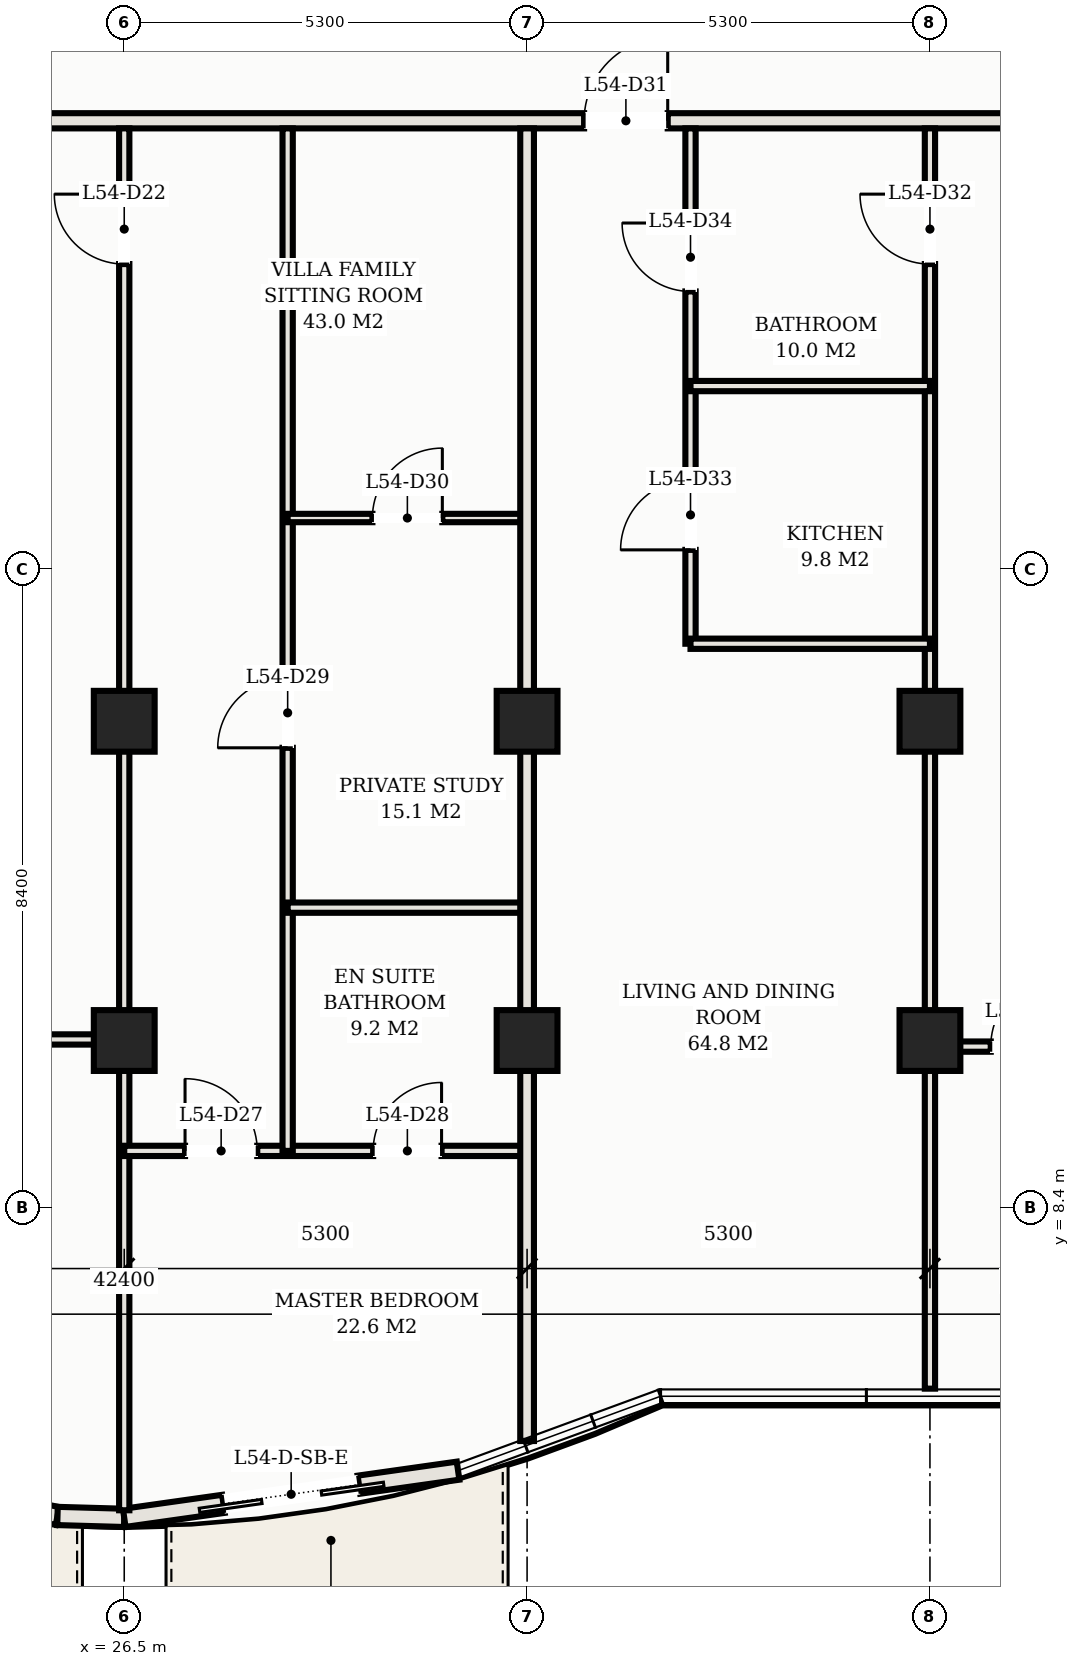
"""IFC4 building model, lengths in metres.
Left out: names, types, materials, properties, quantities, classifications, styles, units other than length and angle.
Written with IfcOpenShell. Run it as: python <this file> out.ifc"""

import sys

from ifc_helpers import new_model, si_unit, direction, frame, frame_2d, origin, origin_2d, place, context, subcontext, project, spatial, rectangle, hollow_rectangle, extrude, element, fill, save


model = new_model("IFC4")
c1 = context("Model", 3, precision=1e-05, world=origin(), true_north=direction((0.0, 1.0)))
c2 = subcontext(c1, "Body", "Model", "MODEL_VIEW")
j1 = project(units=[si_unit("LENGTHUNIT", "METRE"), si_unit("PLANEANGLEUNIT", "RADIAN")], contexts=[c1])
p1 = place(None, origin())
s1 = spatial("IfcSite", under=j1, at=p1, CompositionType="ELEMENT")
p2 = place(p1, origin())
s2 = spatial("IfcBuilding", under=s1, at=p2, CompositionType="ELEMENT")
p3 = place(p2, frame((0.0, 0.0, 200.0)))
s3 = spatial("IfcBuildingStorey", under=s2, at=p3, CompositionType="ELEMENT", Elevation=200.0)
for number, where, z_axis, x_axis in (
    (1, (26.5, 14.8, 0.0), (0.0, 0.0, 1.0), (1.0, 0.0, 0.0)),
    (2, (26.5, 10.6, 0.0), (0.0, 0.0, 1.0), (1.0, 0.0, 0.0)),
    (3, (31.8, 14.8, 0.0), (0.0, 0.0, 1.0), (1.0, 0.0, 0.0)),
    (4, (31.8, 10.6, 0.0), (0.0, 0.0, 1.0), (1.0, 0.0, 0.0)),
    (5, (37.1, 14.8, 0.0), (0.0, 0.0, 1.0), (1.0, 0.0, 0.0)),
    (6, (37.1, 10.6, 0.0), (0.0, 0.0, 1.0), (1.0, 0.0, 0.0)),
):
    element("IfcColumn", number, at=place(p3, frame(where, z_axis=z_axis, x_axis=x_axis)), inside=s3, PredefinedType="COLUMN", context=c2, shape_type="SweptSolid", body=[
        extrude(hollow_rectangle(XDim=0.8, YDim=0.8, WallThickness=0.028, at=origin_2d()), origin(), (0.0, 0.0, 1.0), 3.3),
    ])
p4 = place(p3, frame((21.229, 5.214, 0.0), z_axis=(0.0, 0.0, 1.0), x_axis=(0.980985349685, -0.194081796425, 0.0)))
e7 = element("IfcWall", 7, at=p4, inside=s3, PredefinedType="SOLIDWALL", context=c2, shape_type="SweptSolid", body=[
    extrude(rectangle(XDim=4.478, YDim=0.24, at=frame_2d((2.239, 0.0))), origin(), (0.0, 0.0, 1.0), 3.11),
])
p5 = place(p4, frame((1.381, 0.0, 0.0)))
e8 = element("IfcOpeningElement", 8, at=p5, cuts=e7, PredefinedType="OPENING", context=c2, shape_type="SweptSolid", body=[
    extrude(rectangle(XDim=1.8, YDim=2.2, at=frame_2d((0.9, 1.1))), frame((0.0, 0.13, 0.0), z_axis=(0.0, -1.0, 0.0), x_axis=(1.0, 0.0, 0.0)), (0.0, 0.0, 1.0), 0.26),
])
p6 = place(p3, frame((25.622, 4.345, 0.0), z_axis=(0.0, 0.0, 1.0), x_axis=(0.999597960231, -0.028353446035, 0.0)))
e9 = element("IfcWall", 9, at=p6, inside=s3, PredefinedType="SOLIDWALL", context=c2, shape_type="SweptSolid", body=[
    extrude(rectangle(XDim=0.878, YDim=0.24, at=frame_2d((0.439, 0.0))), origin(), (0.0, 0.0, 1.0), 3.11),
])
p7 = place(p3, frame((26.5, 4.32, 0.0), z_axis=(0.0, 0.0, 1.0), x_axis=(0.990156470874, 0.139964864115, 0.0)))
e10 = element("IfcWall", 10, at=p7, inside=s3, PredefinedType="SOLIDWALL", context=c2, shape_type="SweptSolid", body=[
    extrude(rectangle(XDim=4.436, YDim=0.24, at=frame_2d((2.218, 0.0))), origin(), (0.0, 0.0, 1.0), 3.11),
])
p8 = place(p7, frame((1.318, 0.0, 0.0)))
e11 = element("IfcOpeningElement", 11, at=p8, cuts=e10, PredefinedType="OPENING", context=c2, shape_type="SweptSolid", body=[
    extrude(rectangle(XDim=1.8, YDim=2.2, at=frame_2d((0.9, 1.1))), frame((0.0, 0.13, 0.0), z_axis=(0.0, -1.0, 0.0), x_axis=(1.0, 0.0, 0.0)), (0.0, 0.0, 1.0), 0.26),
])
p9 = place(p3, frame((6.72, 22.7, 0.0), z_axis=(0.0, 0.0, 1.0), x_axis=(1.0, 0.0, 0.0)))
e12 = element("IfcWall", 12, at=p9, inside=s3, PredefinedType="PARTITIONING", context=c2, shape_type="SweptSolid", body=[
    extrude(rectangle(XDim=39.56, YDim=0.2, at=frame_2d((19.78, 0.0))), origin(), (0.0, 0.0, 1.0), 2.43),
])
p10 = place(p9, frame((4.63, 0.0, 0.0)))
e13 = element("IfcOpeningElement", 13, at=p10, cuts=e12, PredefinedType="OPENING", context=c2, shape_type="SweptSolid", body=[
    extrude(rectangle(XDim=1.1, YDim=2.25, at=frame_2d((0.55, 1.125))), frame((0.0, 0.11, 0.0), z_axis=(0.0, -1.0, 0.0), x_axis=(1.0, 0.0, 0.0)), (0.0, 0.0, 1.0), 0.22),
])
p11 = place(p9, frame((9.93, 0.0, 0.0)))
e14 = element("IfcOpeningElement", 14, at=p11, cuts=e12, PredefinedType="OPENING", context=c2, shape_type="SweptSolid", body=[
    extrude(rectangle(XDim=1.1, YDim=2.25, at=frame_2d((0.55, 1.125))), frame((0.0, 0.11, 0.0), z_axis=(0.0, -1.0, 0.0), x_axis=(1.0, 0.0, 0.0)), (0.0, 0.0, 1.0), 0.22),
])
p12 = place(p9, frame((25.83, 0.0, 0.0)))
e15 = element("IfcOpeningElement", 15, at=p12, cuts=e12, PredefinedType="OPENING", context=c2, shape_type="SweptSolid", body=[
    extrude(rectangle(XDim=1.1, YDim=2.25, at=frame_2d((0.55, 1.125))), frame((0.0, 0.11, 0.0), z_axis=(0.0, -1.0, 0.0), x_axis=(1.0, 0.0, 0.0)), (0.0, 0.0, 1.0), 0.22),
])
p13 = place(p9, frame((1.435, 0.0, 0.0)))
e16 = element("IfcOpeningElement", 16, at=p13, cuts=e12, PredefinedType="OPENING", context=c2, shape_type="SweptSolid", body=[
    extrude(rectangle(XDim=0.92, YDim=2.15, at=frame_2d((0.46, 1.075))), frame((0.0, 0.11, 0.0), z_axis=(0.0, -1.0, 0.0), x_axis=(1.0, 0.0, 0.0)), (0.0, 0.0, 1.0), 0.22),
])
p14 = place(p9, frame((37.205, 0.0, 0.0)))
e17 = element("IfcOpeningElement", 17, at=p14, cuts=e12, PredefinedType="OPENING", context=c2, shape_type="SweptSolid", body=[
    extrude(rectangle(XDim=0.92, YDim=2.15, at=frame_2d((0.46, 1.075))), frame((0.0, 0.11, 0.0), z_axis=(0.0, -1.0, 0.0), x_axis=(1.0, 0.0, 0.0)), (0.0, 0.0, 1.0), 0.22),
])
p15 = place(p3, frame((26.5, 4.42, 0.0), z_axis=(0.0, 0.0, 1.0), x_axis=(0.0, 1.0, 0.0)))
e18 = element("IfcWall", 18, at=p15, inside=s3, PredefinedType="PARTITIONING", context=c2, shape_type="SweptSolid", body=[
    extrude(rectangle(XDim=18.18, YDim=0.135, at=frame_2d((9.09, 0.0))), origin(), (0.0, 0.0, 1.0), 2.43),
])
p16 = place(p15, frame((16.395, 0.0, 0.0)))
e19 = element("IfcOpeningElement", 19, at=p16, cuts=e18, PredefinedType="OPENING", context=c2, shape_type="SweptSolid", body=[
    extrude(rectangle(XDim=0.92, YDim=2.15, at=frame_2d((0.46, 1.075))), frame((0.0, 0.078, 0.0), z_axis=(0.0, -1.0, 0.0), x_axis=(1.0, 0.0, 0.0)), (0.0, 0.0, 1.0), 0.155),
])
p17 = place(p3, frame((15.9, 10.614, 0.0), z_axis=(0.0, 0.0, 1.0), x_axis=(1.0, 0.0, 0.0)))
e20 = element("IfcWall", 20, at=p17, inside=s3, PredefinedType="PARTITIONING", context=c2, shape_type="SweptSolid", body=[
    extrude(rectangle(XDim=10.6, YDim=0.135, at=frame_2d((5.3, 0.0))), origin(), (0.0, 0.0, 1.0), 2.43),
])
p18 = place(p17, frame((0.815, 0.0, 0.0)))
e21 = element("IfcOpeningElement", 21, at=p18, cuts=e20, PredefinedType="OPENING", context=c2, shape_type="SweptSolid", body=[
    extrude(rectangle(XDim=0.92, YDim=2.15, at=frame_2d((0.46, 1.075))), frame((0.0, 0.078, 0.0), z_axis=(0.0, -1.0, 0.0), x_axis=(1.0, 0.0, 0.0)), (0.0, 0.0, 1.0), 0.155),
])
p19 = place(p3, frame((26.5, 9.148, 0.0), z_axis=(0.0, 0.0, 1.0), x_axis=(1.0, 0.0, 0.0)))
e22 = element("IfcWall", 22, at=p19, inside=s3, PredefinedType="PARTITIONING", context=c2, shape_type="SweptSolid", body=[
    extrude(rectangle(XDim=5.3, YDim=0.135, at=frame_2d((2.65, 0.0))), origin(), (0.0, 0.0, 1.0), 2.43),
])
p20 = place(p19, frame((0.8, 0.0, 0.0)))
e23 = element("IfcOpeningElement", 23, at=p20, cuts=e22, PredefinedType="OPENING", context=c2, shape_type="SweptSolid", body=[
    extrude(rectangle(XDim=0.95, YDim=2.15, at=frame_2d((0.475, 1.075))), frame((0.0, 0.078, 0.0), z_axis=(0.0, -1.0, 0.0), x_axis=(1.0, 0.0, 0.0)), (0.0, 0.0, 1.0), 0.155),
])
p21 = place(p19, frame((3.275, 0.0, 0.0)))
e24 = element("IfcOpeningElement", 24, at=p21, cuts=e22, PredefinedType="OPENING", context=c2, shape_type="SweptSolid", body=[
    extrude(rectangle(XDim=0.9, YDim=2.15, at=frame_2d((0.45, 1.075))), frame((0.0, 0.078, 0.0), z_axis=(0.0, -1.0, 0.0), x_axis=(1.0, 0.0, 0.0)), (0.0, 0.0, 1.0), 0.155),
])
p22 = place(p3, frame((28.65, 9.148, 0.0), z_axis=(0.0, 0.0, 1.0), x_axis=(0.0, 1.0, 0.0)))
e25 = element("IfcWall", 25, at=p22, inside=s3, PredefinedType="PARTITIONING", context=c2, shape_type="SweptSolid", body=[
    extrude(rectangle(XDim=13.452, YDim=0.135, at=frame_2d((6.726, 0.0))), origin(), (0.0, 0.0, 1.0), 2.43),
])
p23 = place(p22, frame((5.303, 0.0, 0.0)))
e26 = element("IfcOpeningElement", 26, at=p23, cuts=e25, PredefinedType="OPENING", context=c2, shape_type="SweptSolid", body=[
    extrude(rectangle(XDim=0.92, YDim=2.15, at=frame_2d((0.46, 1.075))), frame((0.0, 0.078, 0.0), z_axis=(0.0, -1.0, 0.0), x_axis=(1.0, 0.0, 0.0)), (0.0, 0.0, 1.0), 0.155),
])
p24 = place(p3, frame((28.65, 12.348, 0.0), z_axis=(0.0, 0.0, 1.0), x_axis=(1.0, 0.0, 0.0)))
e27 = element("IfcWall", 27, at=p24, inside=s3, PredefinedType="PARTITIONING", context=c2, shape_type="SweptSolid", body=[
    extrude(rectangle(XDim=3.15, YDim=0.135, at=frame_2d((1.575, 0.0))), origin(), (0.0, 0.0, 1.0), 2.43),
])
p25 = place(p3, frame((28.65, 17.474, 0.0), z_axis=(0.0, 0.0, 1.0), x_axis=(1.0, 0.0, 0.0)))
e28 = element("IfcWall", 28, at=p25, inside=s3, PredefinedType="MOVABLE", context=c2, shape_type="SweptSolid", body=[
    extrude(rectangle(XDim=3.15, YDim=0.11, at=frame_2d((1.575, 0.0))), origin(), (0.0, 0.0, 1.0), 2.43),
])
p26 = place(p25, frame((1.115, 0.0, 0.0)))
e29 = element("IfcOpeningElement", 29, at=p26, cuts=e28, PredefinedType="OPENING", context=c2, shape_type="SweptSolid", body=[
    extrude(rectangle(XDim=0.92, YDim=2.15, at=frame_2d((0.46, 1.075))), frame((0.0, 0.065, 0.0), z_axis=(0.0, -1.0, 0.0), x_axis=(1.0, 0.0, 0.0)), (0.0, 0.0, 1.0), 0.13),
])
p27 = place(p3, frame((31.8, 5.331, 0.0), z_axis=(0.0, 0.0, 1.0), x_axis=(0.0, 1.0, 0.0)))
e30 = element("IfcWall", 30, at=p27, inside=s3, PredefinedType="PARTITIONING", context=c2, shape_type="SweptSolid", body=[
    extrude(rectangle(XDim=17.269, YDim=0.18, at=frame_2d((8.635, 0.0))), origin(), (0.0, 0.0, 1.0), 2.43),
])
p28 = place(p3, frame((37.1, 6.02, 0.0), z_axis=(0.0, 0.0, 1.0), x_axis=(0.0, 1.0, 0.0)))
e31 = element("IfcWall", 31, at=p28, inside=s3, PredefinedType="PARTITIONING", context=c2, shape_type="SweptSolid", body=[
    extrude(rectangle(XDim=16.58, YDim=0.135, at=frame_2d((8.29, 0.0))), origin(), (0.0, 0.0, 1.0), 2.43),
])
p29 = place(p28, frame((14.795, 0.0, 0.0)))
e32 = element("IfcOpeningElement", 32, at=p29, cuts=e31, PredefinedType="OPENING", context=c2, shape_type="SweptSolid", body=[
    extrude(rectangle(XDim=0.92, YDim=2.15, at=frame_2d((0.46, 1.075))), frame((0.0, 0.078, 0.0), z_axis=(0.0, -1.0, 0.0), x_axis=(1.0, 0.0, 0.0)), (0.0, 0.0, 1.0), 0.155),
])
p30 = place(p3, frame((33.95, 15.82, 0.0), z_axis=(0.0, 0.0, 1.0), x_axis=(0.0, 1.0, 0.0)))
e33 = element("IfcWall", 33, at=p30, inside=s3, PredefinedType="PARTITIONING", context=c2, shape_type="SweptSolid", body=[
    extrude(rectangle(XDim=6.78, YDim=0.135, at=frame_2d((3.39, 0.0))), origin(), (0.0, 0.0, 1.0), 2.43),
])
p31 = place(p30, frame((1.235, 0.0, 0.0)))
e34 = element("IfcOpeningElement", 34, at=p31, cuts=e33, PredefinedType="OPENING", context=c2, shape_type="SweptSolid", body=[
    extrude(rectangle(XDim=0.92, YDim=2.15, at=frame_2d((0.46, 1.075))), frame((0.0, 0.078, 0.0), z_axis=(0.0, -1.0, 0.0), x_axis=(1.0, 0.0, 0.0)), (0.0, 0.0, 1.0), 0.155),
])
p32 = place(p30, frame((4.635, 0.0, 0.0)))
e35 = element("IfcOpeningElement", 35, at=p32, cuts=e33, PredefinedType="OPENING", context=c2, shape_type="SweptSolid", body=[
    extrude(rectangle(XDim=0.9, YDim=2.15, at=frame_2d((0.45, 1.075))), frame((0.0, 0.078, 0.0), z_axis=(0.0, -1.0, 0.0), x_axis=(1.0, 0.0, 0.0)), (0.0, 0.0, 1.0), 0.155),
])
for number, where, z_axis, x_axis in (
    (36, (33.95, 15.82, 0.0), (0.0, 0.0, 1.0), (1.0, 0.0, 0.0)),
    (37, (33.95, 19.21, 0.0), (0.0, 0.0, 1.0), (1.0, 0.0, 0.0)),
):
    element("IfcWall", number, at=place(p3, frame(where, z_axis=z_axis, x_axis=x_axis)), inside=s3, PredefinedType="PARTITIONING", context=c2, shape_type="SweptSolid", body=[
        extrude(rectangle(XDim=3.15, YDim=0.135, at=frame_2d((1.575, 0.0))), origin(), (0.0, 0.0, 1.0), 2.43),
    ])
p33 = place(p3, frame((37.1, 10.52, 0.0), z_axis=(0.0, 0.0, 1.0), x_axis=(1.0, 0.0, 0.0)))
e38 = element("IfcWall", 38, at=p33, inside=s3, PredefinedType="PARTITIONING", context=c2, shape_type="SweptSolid", body=[
    extrude(rectangle(XDim=5.3, YDim=0.135, at=frame_2d((2.65, 0.0))), origin(), (0.0, 0.0, 1.0), 2.43),
])
p34 = place(p33, frame((0.8, 0.0, 0.0)))
e39 = element("IfcOpeningElement", 39, at=p34, cuts=e38, PredefinedType="OPENING", context=c2, shape_type="SweptSolid", body=[
    extrude(rectangle(XDim=0.95, YDim=2.15, at=frame_2d((0.475, 1.075))), frame((0.0, 0.078, 0.0), z_axis=(0.0, -1.0, 0.0), x_axis=(1.0, 0.0, 0.0)), (0.0, 0.0, 1.0), 0.155),
])
p35 = place(p33, frame((2.625, 0.0, 0.0)))
e40 = element("IfcOpeningElement", 40, at=p35, cuts=e38, PredefinedType="OPENING", context=c2, shape_type="SweptSolid", body=[
    extrude(rectangle(XDim=0.9, YDim=2.15, at=frame_2d((0.45, 1.075))), frame((0.0, 0.078, 0.0), z_axis=(0.0, -1.0, 0.0), x_axis=(1.0, 0.0, 0.0)), (0.0, 0.0, 1.0), 0.155),
])
p36 = place(p8, frame((1.8, 0.0, 0.0), z_axis=(0.0, 0.0, 1.0), x_axis=(-1.0, 0.0, 0.0)))
e41 = element("IfcDoor", 41, at=p36, inside=s3, OperationType="DOUBLE_DOOR_SLIDING", PredefinedType="DOOR", context=c2, shape_type="SweptSolid", body=[
    extrude(rectangle(XDim=1.8, YDim=2.2, at=frame_2d((0.9, 1.1))), frame((0.0, 0.025, 0.0), z_axis=(0.0, -1.0, 0.0), x_axis=(1.0, 0.0, 0.0)), (0.0, 0.0, 1.0), 0.05),
])
fill(e11, e41)
p37 = place(p16, origin())
e42 = element("IfcDoor", 42, at=p37, inside=s3, OperationType="SINGLE_SWING_RIGHT", PredefinedType="DOOR", context=c2, shape_type="SweptSolid", body=[
    extrude(rectangle(XDim=0.92, YDim=2.15, at=frame_2d((0.46, 1.075))), frame((0.0, 0.025, 0.0), z_axis=(0.0, -1.0, 0.0), x_axis=(1.0, 0.0, 0.0)), (0.0, 0.0, 1.0), 0.05),
])
fill(e19, e42)
p38 = place(p20, origin())
e43 = element("IfcDoor", 43, at=p38, inside=s3, OperationType="SINGLE_SWING_LEFT", PredefinedType="DOOR", context=c2, shape_type="SweptSolid", body=[
    extrude(rectangle(XDim=0.95, YDim=2.15, at=frame_2d((0.475, 1.075))), frame((0.0, 0.025, 0.0), z_axis=(0.0, -1.0, 0.0), x_axis=(1.0, 0.0, 0.0)), (0.0, 0.0, 1.0), 0.05),
])
fill(e23, e43)
p39 = place(p21, origin())
e44 = element("IfcDoor", 44, at=p39, inside=s3, OperationType="SINGLE_SWING_RIGHT", PredefinedType="DOOR", context=c2, shape_type="SweptSolid", body=[
    extrude(rectangle(XDim=0.9, YDim=2.15, at=frame_2d((0.45, 1.075))), frame((0.0, 0.025, 0.0), z_axis=(0.0, -1.0, 0.0), x_axis=(1.0, 0.0, 0.0)), (0.0, 0.0, 1.0), 0.05),
])
fill(e24, e44)
p40 = place(p23, origin())
e45 = element("IfcDoor", 45, at=p40, inside=s3, OperationType="SINGLE_SWING_LEFT", PredefinedType="DOOR", context=c2, shape_type="SweptSolid", body=[
    extrude(rectangle(XDim=0.92, YDim=2.15, at=frame_2d((0.46, 1.075))), frame((0.0, 0.025, 0.0), z_axis=(0.0, -1.0, 0.0), x_axis=(1.0, 0.0, 0.0)), (0.0, 0.0, 1.0), 0.05),
])
fill(e26, e45)
p41 = place(p26, origin())
e46 = element("IfcDoor", 46, at=p41, inside=s3, OperationType="SINGLE_SWING_RIGHT", PredefinedType="DOOR", context=c2, shape_type="SweptSolid", body=[
    extrude(rectangle(XDim=0.92, YDim=2.15, at=frame_2d((0.46, 1.075))), frame((0.0, 0.025, 0.0), z_axis=(0.0, -1.0, 0.0), x_axis=(1.0, 0.0, 0.0)), (0.0, 0.0, 1.0), 0.05),
])
fill(e29, e46)
p42 = place(p12, origin())
e47 = element("IfcDoor", 47, at=p42, inside=s3, OperationType="SINGLE_SWING_RIGHT", PredefinedType="DOOR", context=c2, shape_type="SweptSolid", body=[
    extrude(rectangle(XDim=1.1, YDim=2.25, at=frame_2d((0.55, 1.125))), frame((0.0, 0.025, 0.0), z_axis=(0.0, -1.0, 0.0), x_axis=(1.0, 0.0, 0.0)), (0.0, 0.0, 1.0), 0.05),
])
fill(e15, e47)
p43 = place(p29, origin())
e48 = element("IfcDoor", 48, at=p43, inside=s3, OperationType="SINGLE_SWING_RIGHT", PredefinedType="DOOR", context=c2, shape_type="SweptSolid", body=[
    extrude(rectangle(XDim=0.92, YDim=2.15, at=frame_2d((0.46, 1.075))), frame((0.0, 0.025, 0.0), z_axis=(0.0, -1.0, 0.0), x_axis=(1.0, 0.0, 0.0)), (0.0, 0.0, 1.0), 0.05),
])
fill(e32, e48)
p44 = place(p31, origin())
e49 = element("IfcDoor", 49, at=p44, inside=s3, OperationType="SINGLE_SWING_LEFT", PredefinedType="DOOR", context=c2, shape_type="SweptSolid", body=[
    extrude(rectangle(XDim=0.92, YDim=2.15, at=frame_2d((0.46, 1.075))), frame((0.0, 0.025, 0.0), z_axis=(0.0, -1.0, 0.0), x_axis=(1.0, 0.0, 0.0)), (0.0, 0.0, 1.0), 0.05),
])
fill(e34, e49)
p45 = place(p32, origin())
e50 = element("IfcDoor", 50, at=p45, inside=s3, OperationType="SINGLE_SWING_RIGHT", PredefinedType="DOOR", context=c2, shape_type="SweptSolid", body=[
    extrude(rectangle(XDim=0.9, YDim=2.15, at=frame_2d((0.45, 1.075))), frame((0.0, 0.025, 0.0), z_axis=(0.0, -1.0, 0.0), x_axis=(1.0, 0.0, 0.0)), (0.0, 0.0, 1.0), 0.05),
])
fill(e35, e50)
p46 = place(p34, origin())
e51 = element("IfcDoor", 51, at=p46, inside=s3, OperationType="SINGLE_SWING_RIGHT", PredefinedType="DOOR", context=c2, shape_type="SweptSolid", body=[
    extrude(rectangle(XDim=0.95, YDim=2.15, at=frame_2d((0.475, 1.075))), frame((0.0, 0.025, 0.0), z_axis=(0.0, -1.0, 0.0), x_axis=(1.0, 0.0, 0.0)), (0.0, 0.0, 1.0), 0.05),
])
fill(e39, e51)
save(model, sys.argv[1])
